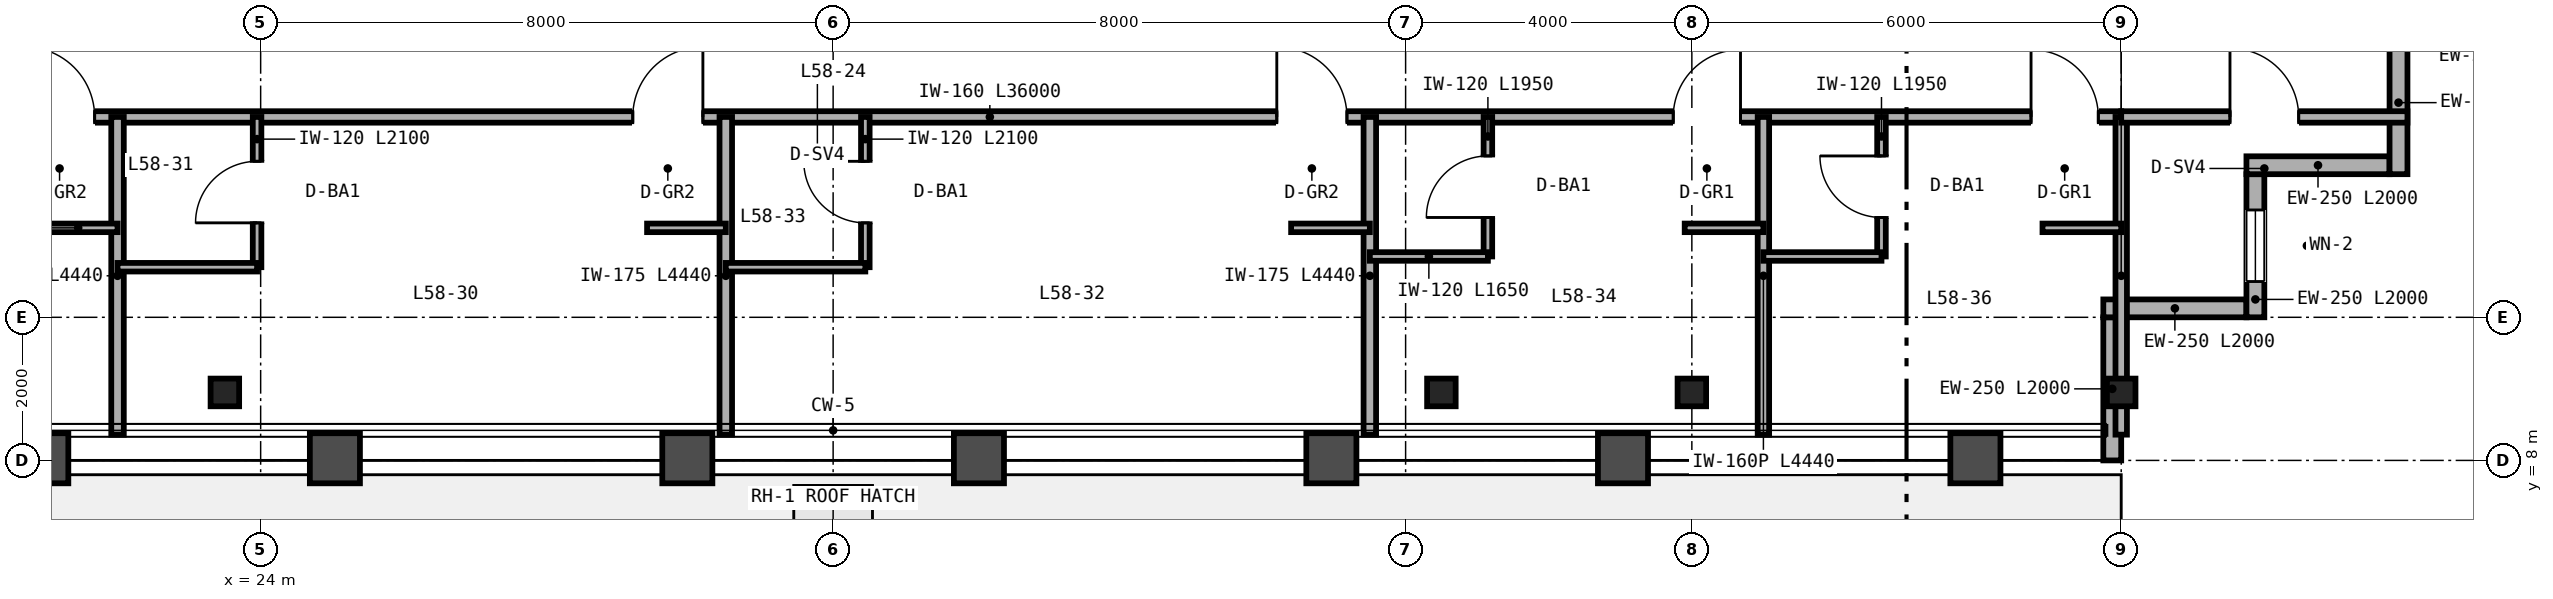
"""IFC4 building model, lengths in metres.
Left out: names, types, materials, properties, quantities, classifications, styles, units other than length and angle.
Written with IfcOpenShell. Run it as: python <this file> out.ifc"""

import sys

from ifc_helpers import new_model, si_unit, direction, frame, frame_2d, origin, origin_2d, place, context, subcontext, project, spatial, rectangle, i_section, extrude, source, transform, mapped, element, fill, save


model = new_model("IFC4")
c1 = context("Model", 3, precision=1e-05, world=origin(), true_north=direction((0.0, 1.0)))
c2 = subcontext(c1, "Body", "Model", "MODEL_VIEW")
j1 = project(units=[si_unit("LENGTHUNIT", "METRE"), si_unit("PLANEANGLEUNIT", "RADIAN")], contexts=[c1])
p1 = place(None, origin())
s1 = spatial("IfcSite", under=j1, at=p1, CompositionType="ELEMENT")
p2 = place(p1, origin())
s2 = spatial("IfcBuilding", under=s1, at=p2, CompositionType="ELEMENT")
p3 = place(p2, frame((0.0, 0.0, 232.8)))
s3 = spatial("IfcBuildingStorey", under=s2, at=p3, CompositionType="ELEMENT", Elevation=232.8)
m1 = source(origin(), c2, "Body", "SweptSolid", [
    extrude(i_section(OverallWidth=0.399, OverallDepth=0.387, WebThickness=0.021, FlangeThickness=0.033, FilletRadius=0.025, at=origin_2d()), origin(), (0.0, 0.0, 1.0), 3.38),
])
for number, where, z_axis, x_axis in (
    (1, (23.5, 8.95, 0.0), (0.0, 0.0, 1.0), (1.0, 0.0, 0.0)),
    (2, (40.5, 8.95, 0.0), (0.0, 0.0, 1.0), (1.0, 0.0, 0.0)),
    (3, (44.0, 8.95, 0.0), (0.0, 0.0, 1.0), (1.0, 0.0, 0.0)),
    (4, (50.0, 8.95, 0.0), (0.0, 0.0, 1.0), (1.0, 0.0, 0.0)),
):
    element("IfcColumn", number, at=place(p3, frame(where, z_axis=z_axis, x_axis=x_axis)), inside=s3, PredefinedType="COLUMN", context=c2, shape_type="MappedRepresentation", body=[
        mapped(m1, transform((0.0, 0.0, 0.0), scale=1.0)),
    ])
p4 = place(p3, frame((49.875, 8.0, 0.0), z_axis=(0.0, 0.0, 1.0), x_axis=(0.0, 1.0, 0.0)))
e5 = element("IfcWall", 5, at=p4, inside=s3, PredefinedType="SOLIDWALL", context=c2, shape_type="SweptSolid", body=[
    extrude(rectangle(XDim=2.0, YDim=0.25, at=frame_2d((1.0, 0.0))), origin(), (0.0, 0.0, 1.0), 2.687),
])
p5 = place(p3, frame((49.75, 10.125, 0.0), z_axis=(0.0, 0.0, 1.0), x_axis=(1.0, 0.0, 0.0)))
e6 = element("IfcWall", 6, at=p5, inside=s3, PredefinedType="SOLIDWALL", context=c2, shape_type="SweptSolid", body=[
    extrude(rectangle(XDim=2.0, YDim=0.25, at=frame_2d((1.0, 0.0))), origin(), (0.0, 0.0, 1.0), 3.38),
])
p6 = place(p3, frame((51.875, 10.0, 0.0), z_axis=(0.0, 0.0, 1.0), x_axis=(0.0, 1.0, 0.0)))
e7 = element("IfcWall", 7, at=p6, inside=s3, PredefinedType="SOLIDWALL", context=c2, shape_type="SweptSolid", body=[
    extrude(rectangle(XDim=2.0, YDim=0.25, at=frame_2d((1.0, 0.0))), origin(), (0.0, 0.0, 1.0), 3.38),
])
p7 = place(p6, frame((0.5, 0.0, 0.85)))
e8 = element("IfcOpeningElement", 8, at=p7, cuts=e7, PredefinedType="OPENING", context=c2, shape_type="SweptSolid", body=[
    extrude(rectangle(XDim=1.0, YDim=1.9, at=frame_2d((0.5, 0.95))), frame((0.0, 0.135, 0.0), z_axis=(0.0, -1.0, 0.0), x_axis=(1.0, 0.0, 0.0)), (0.0, 0.0, 1.0), 0.27),
])
for number, where, z_axis, x_axis in (
    (9, (51.75, 12.125, 0.0), (0.0, 0.0, 1.0), (1.0, 0.0, 0.0)),
    (10, (53.875, 12.0, 0.0), (0.0, 0.0, 1.0), (0.0, 1.0, 0.0)),
):
    element("IfcWall", number, at=place(p3, frame(where, z_axis=z_axis, x_axis=x_axis)), inside=s3, PredefinedType="SOLIDWALL", context=c2, shape_type="SweptSolid", body=[
        extrude(rectangle(XDim=2.0, YDim=0.25, at=frame_2d((1.0, 0.0))), origin(), (0.0, 0.0, 1.0), 3.38),
    ])
p8 = place(p3, frame((14.0, 12.8, 0.0), z_axis=(0.0, 0.0, 1.0), x_axis=(1.0, 0.0, 0.0)))
e11 = element("IfcWall", 11, at=p8, inside=s3, PredefinedType="PARTITIONING", context=c2, shape_type="SweptSolid", body=[
    extrude(rectangle(XDim=36.0, YDim=0.16, at=frame_2d((18.0, 0.0))), origin(), (0.0, 0.0, 1.0), 2.923),
])
p9 = place(p8, frame((6.7, 0.0, 0.0)))
e12 = element("IfcOpeningElement", 12, at=p9, cuts=e11, PredefinedType="OPENING", context=c2, shape_type="SweptSolid", body=[
    extrude(rectangle(XDim=0.98, YDim=2.2, at=frame_2d((0.49, 1.1))), frame((0.0, 0.09, 0.0), z_axis=(0.0, -1.0, 0.0), x_axis=(1.0, 0.0, 0.0)), (0.0, 0.0, 1.0), 0.18),
])
p10 = place(p8, frame((15.2, 0.0, 0.0)))
e13 = element("IfcOpeningElement", 13, at=p10, cuts=e11, PredefinedType="OPENING", context=c2, shape_type="SweptSolid", body=[
    extrude(rectangle(XDim=0.98, YDim=2.2, at=frame_2d((0.49, 1.1))), frame((0.0, 0.09, 0.0), z_axis=(0.0, -1.0, 0.0), x_axis=(1.0, 0.0, 0.0)), (0.0, 0.0, 1.0), 0.18),
])
p11 = place(p8, frame((24.2, 0.0, 0.0)))
e14 = element("IfcOpeningElement", 14, at=p11, cuts=e11, PredefinedType="OPENING", context=c2, shape_type="SweptSolid", body=[
    extrude(rectangle(XDim=0.98, YDim=2.2, at=frame_2d((0.49, 1.1))), frame((0.0, 0.09, 0.0), z_axis=(0.0, -1.0, 0.0), x_axis=(1.0, 0.0, 0.0)), (0.0, 0.0, 1.0), 0.18),
])
p12 = place(p8, frame((29.74, 0.0, 0.0)))
e15 = element("IfcOpeningElement", 15, at=p12, cuts=e11, PredefinedType="OPENING", context=c2, shape_type="SweptSolid", body=[
    extrude(rectangle(XDim=0.94, YDim=2.15, at=frame_2d((0.47, 1.075))), frame((0.0, 0.09, 0.0), z_axis=(0.0, -1.0, 0.0), x_axis=(1.0, 0.0, 0.0)), (0.0, 0.0, 1.0), 0.18),
])
p13 = place(p8, frame((34.74, 0.0, 0.0)))
e16 = element("IfcOpeningElement", 16, at=p13, cuts=e11, PredefinedType="OPENING", context=c2, shape_type="SweptSolid", body=[
    extrude(rectangle(XDim=0.94, YDim=2.15, at=frame_2d((0.47, 1.075))), frame((0.0, 0.09, 0.0), z_axis=(0.0, -1.0, 0.0), x_axis=(1.0, 0.0, 0.0)), (0.0, 0.0, 1.0), 0.18),
])
p14 = place(p3, frame((50.0, 8.36, 0.0), z_axis=(0.0, 0.0, 1.0), x_axis=(0.0, 1.0, 0.0)))
e17 = element("IfcWall", 17, at=p14, inside=s3, PredefinedType="PARTITIONING", context=c2, shape_type="SweptSolid", body=[
    extrude(rectangle(XDim=4.44, YDim=0.16, at=frame_2d((2.22, 0.0))), origin(), (0.0, 0.0, 1.0), 2.687),
])
p15 = place(p3, frame((22.0, 8.36, 0.0), z_axis=(0.0, 0.0, 1.0), x_axis=(0.0, 1.0, 0.0)))
e18 = element("IfcWall", 18, at=p15, inside=s3, PredefinedType="PARTITIONING", context=c2, shape_type="SweptSolid", body=[
    extrude(rectangle(XDim=4.44, YDim=0.175, at=frame_2d((2.22, 0.0))), origin(), (0.0, 0.0, 1.0), 2.843),
])
p16 = place(p3, frame((20.9, 11.25, 0.0), z_axis=(0.0, 0.0, 1.0), x_axis=(1.0, 0.0, 0.0)))
e19 = element("IfcWall", 19, at=p16, inside=s3, PredefinedType="PARTITIONING", context=c2, shape_type="SweptSolid", body=[
    extrude(rectangle(XDim=1.1, YDim=0.12, at=frame_2d((0.55, 0.0))), origin(), (0.0, 0.0, 1.0), 3.38),
])
p17 = place(p3, frame((30.5, 8.36, 0.0), z_axis=(0.0, 0.0, 1.0), x_axis=(0.0, 1.0, 0.0)))
e20 = element("IfcWall", 20, at=p17, inside=s3, PredefinedType="PARTITIONING", context=c2, shape_type="SweptSolid", body=[
    extrude(rectangle(XDim=4.44, YDim=0.175, at=frame_2d((2.22, 0.0))), origin(), (0.0, 0.0, 1.0), 2.453),
])
p18 = place(p3, frame((23.95, 10.7, 0.0), z_axis=(0.0, 0.0, 1.0), x_axis=(0.0, 1.0, 0.0)))
e21 = element("IfcWall", 21, at=p18, inside=s3, PredefinedType="PARTITIONING", context=c2, shape_type="SweptSolid", body=[
    extrude(rectangle(XDim=2.1, YDim=0.12, at=frame_2d((1.05, 0.0))), origin(), (0.0, 0.0, 1.0), 3.38),
])
p19 = place(p18, frame((0.62, 0.0, 0.0)))
e22 = element("IfcOpeningElement", 22, at=p19, cuts=e21, PredefinedType="OPENING", context=c2, shape_type="SweptSolid", body=[
    extrude(rectangle(XDim=0.86, YDim=2.1, at=frame_2d((0.43, 1.05))), frame((0.0, 0.07, 0.0), z_axis=(0.0, -1.0, 0.0), x_axis=(1.0, 0.0, 0.0)), (0.0, 0.0, 1.0), 0.14),
])
p20 = place(p3, frame((22.0, 10.7, 0.0), z_axis=(0.0, 0.0, 1.0), x_axis=(1.0, 0.0, 0.0)))
e23 = element("IfcWall", 23, at=p20, inside=s3, PredefinedType="PARTITIONING", context=c2, shape_type="SweptSolid", body=[
    extrude(rectangle(XDim=1.95, YDim=0.12, at=frame_2d((0.975, 0.0))), origin(), (0.0, 0.0, 1.0), 2.923),
])
p21 = place(p3, frame((29.4, 11.25, 0.0), z_axis=(0.0, 0.0, 1.0), x_axis=(1.0, 0.0, 0.0)))
e24 = element("IfcWall", 24, at=p21, inside=s3, PredefinedType="PARTITIONING", context=c2, shape_type="SweptSolid", body=[
    extrude(rectangle(XDim=1.1, YDim=0.12, at=frame_2d((0.55, 0.0))), origin(), (0.0, 0.0, 1.0), 3.38),
])
p22 = place(p3, frame((39.5, 8.36, 0.0), z_axis=(0.0, 0.0, 1.0), x_axis=(0.0, 1.0, 0.0)))
e25 = element("IfcWall", 25, at=p22, inside=s3, PredefinedType="PARTITIONING", context=c2, shape_type="SweptSolid", body=[
    extrude(rectangle(XDim=4.44, YDim=0.175, at=frame_2d((2.22, 0.0))), origin(), (0.0, 0.0, 1.0), 2.453),
])
p23 = place(p3, frame((32.45, 10.7, 0.0), z_axis=(0.0, 0.0, 1.0), x_axis=(0.0, 1.0, 0.0)))
e26 = element("IfcWall", 26, at=p23, inside=s3, PredefinedType="PARTITIONING", context=c2, shape_type="SweptSolid", body=[
    extrude(rectangle(XDim=2.1, YDim=0.12, at=frame_2d((1.05, 0.0))), origin(), (0.0, 0.0, 1.0), 3.38),
])
p24 = place(p23, frame((0.62, 0.0, 0.0)))
e27 = element("IfcOpeningElement", 27, at=p24, cuts=e26, PredefinedType="OPENING", context=c2, shape_type="SweptSolid", body=[
    extrude(rectangle(XDim=0.86, YDim=2.1, at=frame_2d((0.43, 1.05))), frame((0.0, 0.07, 0.0), z_axis=(0.0, -1.0, 0.0), x_axis=(1.0, 0.0, 0.0)), (0.0, 0.0, 1.0), 0.14),
])
p25 = place(p3, frame((30.5, 10.7, 0.0), z_axis=(0.0, 0.0, 1.0), x_axis=(1.0, 0.0, 0.0)))
e28 = element("IfcWall", 28, at=p25, inside=s3, PredefinedType="PARTITIONING", context=c2, shape_type="SweptSolid", body=[
    extrude(rectangle(XDim=1.95, YDim=0.12, at=frame_2d((0.975, 0.0))), origin(), (0.0, 0.0, 1.0), 3.38),
])
p26 = place(p3, frame((38.4, 11.25, 0.0), z_axis=(0.0, 0.0, 1.0), x_axis=(1.0, 0.0, 0.0)))
e29 = element("IfcWall", 29, at=p26, inside=s3, PredefinedType="PARTITIONING", context=c2, shape_type="SweptSolid", body=[
    extrude(rectangle(XDim=1.1, YDim=0.12, at=frame_2d((0.55, 0.0))), origin(), (0.0, 0.0, 1.0), 3.38),
])
p27 = place(p3, frame((45.0, 8.36, 0.0), z_axis=(0.0, 0.0, 1.0), x_axis=(0.0, 1.0, 0.0)))
e30 = element("IfcWall", 30, at=p27, inside=s3, PredefinedType="PARTITIONING", context=c2, shape_type="SweptSolid", body=[
    extrude(rectangle(XDim=4.44, YDim=0.16, at=frame_2d((2.22, 0.0))), origin(), (0.0, 0.0, 1.0), 2.687),
])
p28 = place(p3, frame((41.15, 10.85, 0.0), z_axis=(0.0, 0.0, 1.0), x_axis=(0.0, 1.0, 0.0)))
e31 = element("IfcWall", 31, at=p28, inside=s3, PredefinedType="PARTITIONING", context=c2, shape_type="SweptSolid", body=[
    extrude(rectangle(XDim=1.95, YDim=0.12, at=frame_2d((0.975, 0.0))), origin(), (0.0, 0.0, 1.0), 3.38),
])
p29 = place(p28, frame((0.545, 0.0, 0.0)))
e32 = element("IfcOpeningElement", 32, at=p29, cuts=e31, PredefinedType="OPENING", context=c2, shape_type="SweptSolid", body=[
    extrude(rectangle(XDim=0.86, YDim=2.1, at=frame_2d((0.43, 1.05))), frame((0.0, 0.07, 0.0), z_axis=(0.0, -1.0, 0.0), x_axis=(1.0, 0.0, 0.0)), (0.0, 0.0, 1.0), 0.14),
])
p30 = place(p3, frame((39.5, 10.85, 0.0), z_axis=(0.0, 0.0, 1.0), x_axis=(1.0, 0.0, 0.0)))
e33 = element("IfcWall", 33, at=p30, inside=s3, PredefinedType="PARTITIONING", context=c2, shape_type="SweptSolid", body=[
    extrude(rectangle(XDim=1.65, YDim=0.12, at=frame_2d((0.825, 0.0))), origin(), (0.0, 0.0, 1.0), 2.923),
])
p31 = place(p3, frame((43.9, 11.25, 0.0), z_axis=(0.0, 0.0, 1.0), x_axis=(1.0, 0.0, 0.0)))
e34 = element("IfcWall", 34, at=p31, inside=s3, PredefinedType="PARTITIONING", context=c2, shape_type="SweptSolid", body=[
    extrude(rectangle(XDim=1.1, YDim=0.12, at=frame_2d((0.55, 0.0))), origin(), (0.0, 0.0, 1.0), 3.38),
])
p32 = place(p3, frame((46.65, 10.85, 0.0), z_axis=(0.0, 0.0, 1.0), x_axis=(0.0, 1.0, 0.0)))
e35 = element("IfcWall", 35, at=p32, inside=s3, PredefinedType="PARTITIONING", context=c2, shape_type="SweptSolid", body=[
    extrude(rectangle(XDim=1.95, YDim=0.12, at=frame_2d((0.975, 0.0))), origin(), (0.0, 0.0, 1.0), 3.38),
])
p33 = place(p32, frame((0.545, 0.0, 0.0)))
e36 = element("IfcOpeningElement", 36, at=p33, cuts=e35, PredefinedType="OPENING", context=c2, shape_type="SweptSolid", body=[
    extrude(rectangle(XDim=0.86, YDim=2.1, at=frame_2d((0.43, 1.05))), frame((0.0, 0.07, 0.0), z_axis=(0.0, -1.0, 0.0), x_axis=(1.0, 0.0, 0.0)), (0.0, 0.0, 1.0), 0.14),
])
p34 = place(p3, frame((45.0, 10.85, 0.0), z_axis=(0.0, 0.0, 1.0), x_axis=(1.0, 0.0, 0.0)))
e37 = element("IfcWall", 37, at=p34, inside=s3, PredefinedType="PARTITIONING", context=c2, shape_type="SweptSolid", body=[
    extrude(rectangle(XDim=1.65, YDim=0.12, at=frame_2d((0.825, 0.0))), origin(), (0.0, 0.0, 1.0), 3.38),
])
p35 = place(p3, frame((48.9, 11.25, 0.0), z_axis=(0.0, 0.0, 1.0), x_axis=(1.0, 0.0, 0.0)))
e38 = element("IfcWall", 38, at=p35, inside=s3, PredefinedType="PARTITIONING", context=c2, shape_type="SweptSolid", body=[
    extrude(rectangle(XDim=1.1, YDim=0.12, at=frame_2d((0.55, 0.0))), origin(), (0.0, 0.0, 1.0), 3.38),
])
p36 = place(p3, frame((50.0, 12.8, 0.0), z_axis=(0.0, 0.0, 1.0), x_axis=(1.0, 0.0, 0.0)))
e39 = element("IfcWall", 39, at=p36, inside=s3, PredefinedType="PARTITIONING", context=c2, shape_type="SweptSolid", body=[
    extrude(rectangle(XDim=4.0, YDim=0.16, at=frame_2d((2.0, 0.0))), origin(), (0.0, 0.0, 1.0), 3.38),
])
p37 = place(p36, frame((1.52, 0.0, 0.0)))
e40 = element("IfcOpeningElement", 40, at=p37, cuts=e39, PredefinedType="OPENING", context=c2, shape_type="SweptSolid", body=[
    extrude(rectangle(XDim=0.96, YDim=2.15, at=frame_2d((0.48, 1.075))), frame((0.0, 0.09, 0.0), z_axis=(0.0, -1.0, 0.0), x_axis=(1.0, 0.0, 0.0)), (0.0, 0.0, 1.0), 0.18),
])
m2 = source(origin(), c2, "Body", "SweptSolid", [
    extrude(rectangle(XDim=1.0, YDim=1.9, at=frame_2d((0.5, 0.95))), frame((0.0, 0.03, 0.0), z_axis=(0.0, -1.0, 0.0), x_axis=(1.0, 0.0, 0.0)), (0.0, 0.0, 1.0), 0.06),
])
p38 = place(p7, origin())
e41 = element("IfcWindow", 41, at=p38, inside=s3, PartitioningType="SINGLE_PANEL", PredefinedType="WINDOW", context=c2, shape_type="MappedRepresentation", body=[
    mapped(m2, transform((0.0, 0.0, 0.0), scale=1.0)),
])
fill(e8, e41)
p39 = place(p3, frame((0.0, 0.0, -0.22)))
p40 = place(p39, frame((32.0, 7.1, 0.0)))
p41 = place(p40, frame((0.0, 0.0, 0.17)))
e42 = element("IfcDoor", 42, at=p41, inside=s3, OperationType="SINGLE_SWING_LEFT", PredefinedType="TRAPDOOR", context=c2, shape_type="SweptSolid", body=[
    extrude(rectangle(XDim=1.1, YDim=1.1, at=origin_2d()), origin(), (0.0, 0.0, 1.0), 0.05),
])
m3 = source(origin(), c2, "Body", "SweptSolid", [
    extrude(rectangle(XDim=0.86, YDim=2.1, at=frame_2d((0.43, 1.05))), frame((0.0, 0.025, 0.0), z_axis=(0.0, -1.0, 0.0), x_axis=(1.0, 0.0, 0.0)), (0.0, 0.0, 1.0), 0.05),
])
p42 = place(p19, origin())
e43 = element("IfcDoor", 43, at=p42, inside=s3, OperationType="SINGLE_SWING_LEFT", PredefinedType="DOOR", context=c2, shape_type="MappedRepresentation", body=[
    mapped(m3, transform((0.0, 0.0, 0.0), scale=1.0)),
])
fill(e22, e43)
p43 = place(p24, origin())
e44 = element("IfcDoor", 44, at=p43, inside=s3, OperationType="SINGLE_SWING_RIGHT", PredefinedType="DOOR", context=c2, shape_type="MappedRepresentation", body=[
    mapped(m3, transform((0.0, 0.0, 0.0), scale=1.0)),
])
fill(e27, e44)
p44 = place(p29, origin())
e45 = element("IfcDoor", 45, at=p44, inside=s3, OperationType="SINGLE_SWING_LEFT", PredefinedType="DOOR", context=c2, shape_type="MappedRepresentation", body=[
    mapped(m3, transform((0.0, 0.0, 0.0), scale=1.0)),
])
fill(e32, e45)
p45 = place(p33, origin())
e46 = element("IfcDoor", 46, at=p45, inside=s3, OperationType="SINGLE_SWING_RIGHT", PredefinedType="DOOR", context=c2, shape_type="MappedRepresentation", body=[
    mapped(m3, transform((0.0, 0.0, 0.0), scale=1.0)),
])
fill(e36, e46)
m4 = source(origin(), c2, "Body", "SweptSolid", [
    extrude(rectangle(XDim=0.98, YDim=2.2, at=frame_2d((0.49, 1.1))), frame((0.0, 0.025, 0.0), z_axis=(0.0, -1.0, 0.0), x_axis=(1.0, 0.0, 0.0)), (0.0, 0.0, 1.0), 0.05),
])
p46 = place(p9, origin())
e47 = element("IfcDoor", 47, at=p46, inside=s3, OperationType="SINGLE_SWING_LEFT", PredefinedType="DOOR", context=c2, shape_type="MappedRepresentation", body=[
    mapped(m4, transform((0.0, 0.0, 0.0), scale=1.0)),
])
fill(e12, e47)
p47 = place(p10, origin())
e48 = element("IfcDoor", 48, at=p47, inside=s3, OperationType="SINGLE_SWING_RIGHT", PredefinedType="DOOR", context=c2, shape_type="MappedRepresentation", body=[
    mapped(m4, transform((0.0, 0.0, 0.0), scale=1.0)),
])
fill(e13, e48)
p48 = place(p11, origin())
e49 = element("IfcDoor", 49, at=p48, inside=s3, OperationType="SINGLE_SWING_LEFT", PredefinedType="DOOR", context=c2, shape_type="MappedRepresentation", body=[
    mapped(m4, transform((0.0, 0.0, 0.0), scale=1.0)),
])
fill(e14, e49)
m5 = source(origin(), c2, "Body", "SweptSolid", [
    extrude(rectangle(XDim=0.94, YDim=2.15, at=frame_2d((0.47, 1.075))), frame((0.0, 0.025, 0.0), z_axis=(0.0, -1.0, 0.0), x_axis=(1.0, 0.0, 0.0)), (0.0, 0.0, 1.0), 0.05),
])
p49 = place(p12, origin())
e50 = element("IfcDoor", 50, at=p49, inside=s3, OperationType="SINGLE_SWING_RIGHT", PredefinedType="DOOR", context=c2, shape_type="MappedRepresentation", body=[
    mapped(m5, transform((0.0, 0.0, 0.0), scale=1.0)),
])
fill(e15, e50)
p50 = place(p13, origin())
e51 = element("IfcDoor", 51, at=p50, inside=s3, OperationType="SINGLE_SWING_LEFT", PredefinedType="DOOR", context=c2, shape_type="MappedRepresentation", body=[
    mapped(m5, transform((0.0, 0.0, 0.0), scale=1.0)),
])
fill(e16, e51)
m6 = source(origin(), c2, "Body", "SweptSolid", [
    extrude(rectangle(XDim=0.96, YDim=2.15, at=frame_2d((0.48, 1.075))), frame((0.0, 0.025, 0.0), z_axis=(0.0, -1.0, 0.0), x_axis=(1.0, 0.0, 0.0)), (0.0, 0.0, 1.0), 0.05),
])
p51 = place(p37, origin())
e52 = element("IfcDoor", 52, at=p51, inside=s3, OperationType="SINGLE_SWING_LEFT", PredefinedType="DOOR", context=c2, shape_type="MappedRepresentation", body=[
    mapped(m6, transform((0.0, 0.0, 0.0), scale=1.0)),
])
fill(e40, e52)
save(model, sys.argv[1])
